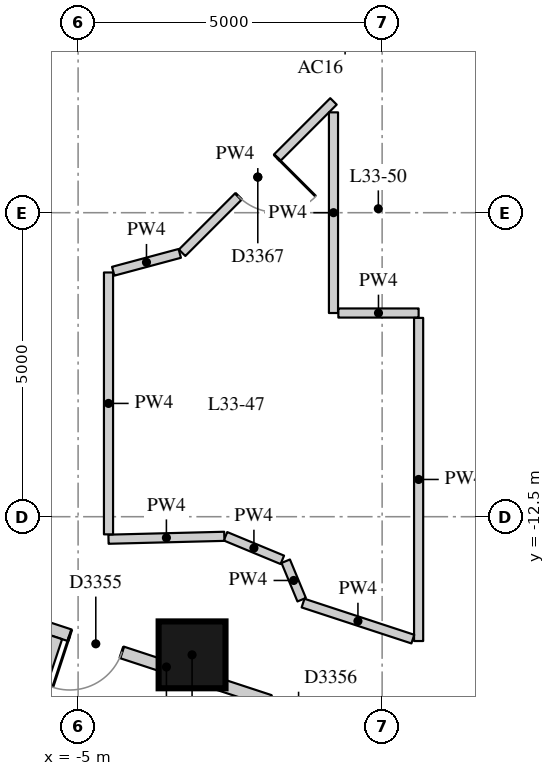
"""IFC4 building model, lengths in metres.
Left out: names, types, materials, properties, quantities, classifications, styles, units other than length and angle.
Written with IfcOpenShell. Run it as: python <this file> out.ifc"""

import sys

from ifc_helpers import new_model, si_unit, direction, frame, frame_2d, origin, origin_2d, place, context, subcontext, project, spatial, rectangle, extrude, element, fill, save


model = new_model("IFC4")
c1 = context("Model", 3, precision=1e-05, world=origin(), true_north=direction((0.0, 1.0)))
c2 = subcontext(c1, "Body", "Model", "MODEL_VIEW")
j1 = project(units=[si_unit("LENGTHUNIT", "METRE"), si_unit("PLANEANGLEUNIT", "RADIAN")], contexts=[c1])
p1 = place(None, origin())
s1 = spatial("IfcSite", under=j1, at=p1, CompositionType="ELEMENT")
p2 = place(p1, origin())
s2 = spatial("IfcBuilding", under=s1, at=p2, CompositionType="ELEMENT")
p3 = place(p2, frame((0.0, 0.0, 118.6)))
s3 = spatial("IfcBuildingStorey", under=s2, at=p3, CompositionType="ELEMENT", Elevation=118.6)
p4 = place(p3, frame((-3.126, -14.772, 0.0), z_axis=(0.0, 0.0, 1.0), x_axis=(1.0, 0.0, 0.0)))
e1 = element("IfcColumn", 1, at=p4, inside=s3, PredefinedType="COLUMN", context=c2, shape_type="SweptSolid", body=[
    extrude(rectangle(XDim=1.1, YDim=1.1, at=origin_2d()), origin(), (0.0, 0.0, 1.0), 3.3),
])
p5 = place(p3, frame((8.984, -13.713, 0.0), z_axis=(0.0, 0.0, 1.0), x_axis=(-0.950093687873, -0.311964716378, 0.0)))
e2 = element("IfcWall", 2, at=p5, inside=s3, PredefinedType="PARTITIONING", context=c2, shape_type="SweptSolid", body=[
    extrude(rectangle(XDim=8.614, YDim=0.2, at=frame_2d((4.307, 0.0))), origin(), (0.0, 0.0, 1.0), 3.02),
])
p6 = place(p5, frame((3.82, 0.0, 0.0)))
e3 = element("IfcOpeningElement", 3, at=p6, cuts=e2, PredefinedType="OPENING", context=c2, shape_type="SweptSolid", body=[
    extrude(rectangle(XDim=1.1, YDim=2.1, at=frame_2d((0.55, 1.05))), frame((0.0, 0.11, 0.0), z_axis=(0.0, -1.0, 0.0), x_axis=(1.0, 0.0, 0.0)), (0.0, 0.0, 1.0), 0.22),
])
p7 = place(p5, frame((0.22, 0.0, 0.0)))
e4 = element("IfcOpeningElement", 4, at=p7, cuts=e2, PredefinedType="OPENING", context=c2, shape_type="SweptSolid", body=[
    extrude(rectangle(XDim=1.1, YDim=2.1, at=frame_2d((0.55, 1.05))), frame((0.0, 0.11, 0.0), z_axis=(0.0, -1.0, 0.0), x_axis=(1.0, 0.0, 0.0)), (0.0, 0.0, 1.0), 0.22),
])
p8 = place(p3, frame((0.705, -16.368, 0.0), z_axis=(0.0, 0.0, 1.0), x_axis=(-0.95010544032, 0.311928921832, 0.0)))
e5 = element("IfcWall", 5, at=p8, inside=s3, PredefinedType="PARTITIONING", context=c2, shape_type="SweptSolid", body=[
    extrude(rectangle(XDim=8.951, YDim=0.2, at=frame_2d((4.476, 0.0))), origin(), (0.0, 0.0, 1.0), 2.57),
])
p9 = place(p8, frame((6.993, 0.0, 0.0)))
e6 = element("IfcOpeningElement", 6, at=p9, cuts=e5, PredefinedType="OPENING", context=c2, shape_type="SweptSolid", body=[
    extrude(rectangle(XDim=1.1, YDim=2.1, at=frame_2d((0.55, 1.05))), frame((0.0, 0.11, 0.0), z_axis=(0.0, -1.0, 0.0), x_axis=(1.0, 0.0, 0.0)), (0.0, 0.0, 1.0), 0.22),
])
p10 = place(p8, frame((5.248, 0.0, 0.0)))
e7 = element("IfcOpeningElement", 7, at=p10, cuts=e5, PredefinedType="OPENING", context=c2, shape_type="SweptSolid", body=[
    extrude(rectangle(XDim=0.9, YDim=2.1, at=frame_2d((0.45, 1.05))), frame((0.0, 0.11, 0.0), z_axis=(0.0, -1.0, 0.0), x_axis=(1.0, 0.0, 0.0)), (0.0, 0.0, 1.0), 0.22),
])
p11 = place(p8, frame((1.688, 0.0, 0.0)))
e8 = element("IfcOpeningElement", 8, at=p11, cuts=e5, PredefinedType="OPENING", context=c2, shape_type="SweptSolid", body=[
    extrude(rectangle(XDim=1.0, YDim=2.1, at=frame_2d((0.5, 1.05))), frame((0.0, 0.11, 0.0), z_axis=(0.0, -1.0, 0.0), x_axis=(1.0, 0.0, 0.0)), (0.0, 0.0, 1.0), 0.22),
])
p12 = place(p3, frame((-3.29, -8.159, 0.0), z_axis=(0.0, 0.0, 1.0), x_axis=(0.707106781187, 0.707106781187, 0.0)))
e9 = element("IfcWall", 9, at=p12, inside=s3, PredefinedType="PARTITIONING", context=c2, shape_type="SweptSolid", body=[
    extrude(rectangle(XDim=3.521, YDim=0.15, at=frame_2d((1.76, 0.0))), origin(), (0.0, 0.0, 1.0), 3.02),
])
p13 = place(p12, frame((1.31, 0.0, 0.0)))
e10 = element("IfcOpeningElement", 10, at=p13, cuts=e9, PredefinedType="OPENING", context=c2, shape_type="SweptSolid", body=[
    extrude(rectangle(XDim=0.9, YDim=2.1, at=frame_2d((0.45, 1.05))), frame((0.0, 0.085, 0.0), z_axis=(0.0, -1.0, 0.0), x_axis=(1.0, 0.0, 0.0)), (0.0, 0.0, 1.0), 0.17),
])
p14 = place(p3, frame((-0.8, -5.85, 0.0), z_axis=(0.0, 0.0, 1.0), x_axis=(0.0, -1.0, 0.0)))
e11 = element("IfcWall", 11, at=p14, inside=s3, PredefinedType="PARTITIONING", context=c2, shape_type="SweptSolid", body=[
    extrude(rectangle(XDim=3.3, YDim=0.15, at=frame_2d((1.65, 0.0))), origin(), (0.0, 0.0, 1.0), 3.02),
])
p15 = place(p3, frame((-0.72, -9.15, 0.0), z_axis=(0.0, 0.0, 1.0), x_axis=(1.0, 0.0, 0.0)))
e12 = element("IfcWall", 12, at=p15, inside=s3, PredefinedType="PARTITIONING", context=c2, shape_type="SweptSolid", body=[
    extrude(rectangle(XDim=1.32, YDim=0.15, at=frame_2d((0.66, 0.0))), origin(), (0.0, 0.0, 1.0), 3.02),
])
p16 = place(p3, frame((0.6, -9.23, 0.0), z_axis=(0.0, 0.0, 1.0), x_axis=(0.0, -1.0, 0.0)))
e13 = element("IfcWall", 13, at=p16, inside=s3, PredefinedType="PARTITIONING", context=c2, shape_type="SweptSolid", body=[
    extrude(rectangle(XDim=5.315, YDim=0.15, at=frame_2d((2.657, 0.0))), origin(), (0.0, 0.0, 1.0), 3.02),
])
p17 = place(p3, frame((0.505, -14.513, 0.0), z_axis=(0.0, 0.0, 1.0), x_axis=(-0.950175898888, 0.31171422998, 0.0)))
e14 = element("IfcWall", 14, at=p17, inside=s3, PredefinedType="PARTITIONING", context=c2, shape_type="SweptSolid", body=[
    extrude(rectangle(XDim=1.9, YDim=0.15, at=frame_2d((0.95, 0.0))), origin(), (0.0, 0.0, 1.0), 3.02),
])
p18 = place(p3, frame((-1.323, -13.865, 0.0), z_axis=(0.0, 0.0, 1.0), x_axis=(-0.382970536008, 0.923760558018, 0.0)))
e15 = element("IfcWall", 15, at=p18, inside=s3, PredefinedType="PARTITIONING", context=c2, shape_type="SweptSolid", body=[
    extrude(rectangle(XDim=0.685, YDim=0.15, at=frame_2d((0.343, 0.0))), origin(), (0.0, 0.0, 1.0), 3.02),
])
p19 = place(p3, frame((-1.641, -13.209, 0.0), z_axis=(0.0, 0.0, 1.0), x_axis=(-0.923725449546, 0.383055209937, 0.0)))
e16 = element("IfcWall", 16, at=p19, inside=s3, PredefinedType="PARTITIONING", context=c2, shape_type="SweptSolid", body=[
    extrude(rectangle(XDim=1.011, YDim=0.15, at=frame_2d((0.506, 0.0))), origin(), (0.0, 0.0, 1.0), 3.02),
])
p20 = place(p3, frame((-2.596, -12.823, 0.0), z_axis=(0.0, 0.0, 1.0), x_axis=(-0.999684436087, -0.025120275573, 0.0)))
e17 = element("IfcWall", 17, at=p20, inside=s3, PredefinedType="PARTITIONING", context=c2, shape_type="SweptSolid", body=[
    extrude(rectangle(XDim=1.905, YDim=0.15, at=frame_2d((0.952, 0.0))), origin(), (0.0, 0.0, 1.0), 3.02),
])
p21 = place(p3, frame((-4.5, -12.79, 0.0), z_axis=(0.0, 0.0, 1.0), x_axis=(0.0, 1.0, 0.0)))
e18 = element("IfcWall", 18, at=p21, inside=s3, PredefinedType="PARTITIONING", context=c2, shape_type="SweptSolid", body=[
    extrude(rectangle(XDim=4.307, YDim=0.15, at=frame_2d((2.154, 0.0))), origin(), (0.0, 0.0, 1.0), 3.02),
])
p22 = place(p3, frame((-4.423, -8.463, 0.0), z_axis=(0.0, 0.0, 1.0), x_axis=(0.965898042479, 0.258922713439, 0.0)))
e19 = element("IfcWall", 19, at=p22, inside=s3, PredefinedType="PARTITIONING", context=c2, shape_type="SweptSolid", body=[
    extrude(rectangle(XDim=1.133, YDim=0.15, at=frame_2d((0.567, 0.0))), origin(), (0.0, 0.0, 1.0), 3.02),
])
p23 = place(p3, frame((-7.469, -20.822, 0.0), z_axis=(0.0, 0.0, 1.0), x_axis=(0.314560923857, 0.949237286026, 0.0)))
e20 = element("IfcWall", 20, at=p23, inside=s3, PredefinedType="PARTITIONING", context=c2, shape_type="SweptSolid", body=[
    extrude(rectangle(XDim=6.681, YDim=0.22, at=frame_2d((3.34, 0.0))), origin(), (0.0, 0.0, 1.0), 3.02),
])
p24 = place(p3, frame((-4.073, -3.927, 0.0), z_axis=(0.0, 0.0, 1.0), x_axis=(-0.923860025149, -0.382730523909, 0.0)))
e21 = element("IfcWall", 21, at=p24, inside=s3, PredefinedType="PARTITIONING", context=c2, shape_type="SweptSolid", body=[
    extrude(rectangle(XDim=4.251, YDim=0.1, at=frame_2d((2.125, 0.0))), origin(), (0.0, 0.0, 1.0), 3.02),
])
p25 = place(p10, origin())
e22 = element("IfcDoor", 22, at=p25, inside=s3, OperationType="SINGLE_SWING_RIGHT", PredefinedType="DOOR", context=c2, shape_type="SweptSolid", body=[
    extrude(rectangle(XDim=0.9, YDim=2.1, at=frame_2d((0.45, 1.05))), frame((0.0, 0.025, 0.0), z_axis=(0.0, -1.0, 0.0), x_axis=(1.0, 0.0, 0.0)), (0.0, 0.0, 1.0), 0.05),
])
fill(e7, e22)
p26 = place(p13, origin())
e23 = element("IfcDoor", 23, at=p26, inside=s3, OperationType="SINGLE_SWING_LEFT", PredefinedType="DOOR", context=c2, shape_type="SweptSolid", body=[
    extrude(rectangle(XDim=0.9, YDim=2.1, at=frame_2d((0.45, 1.05))), frame((0.0, 0.025, 0.0), z_axis=(0.0, -1.0, 0.0), x_axis=(1.0, 0.0, 0.0)), (0.0, 0.0, 1.0), 0.05),
])
fill(e10, e23)
save(model, sys.argv[1])
